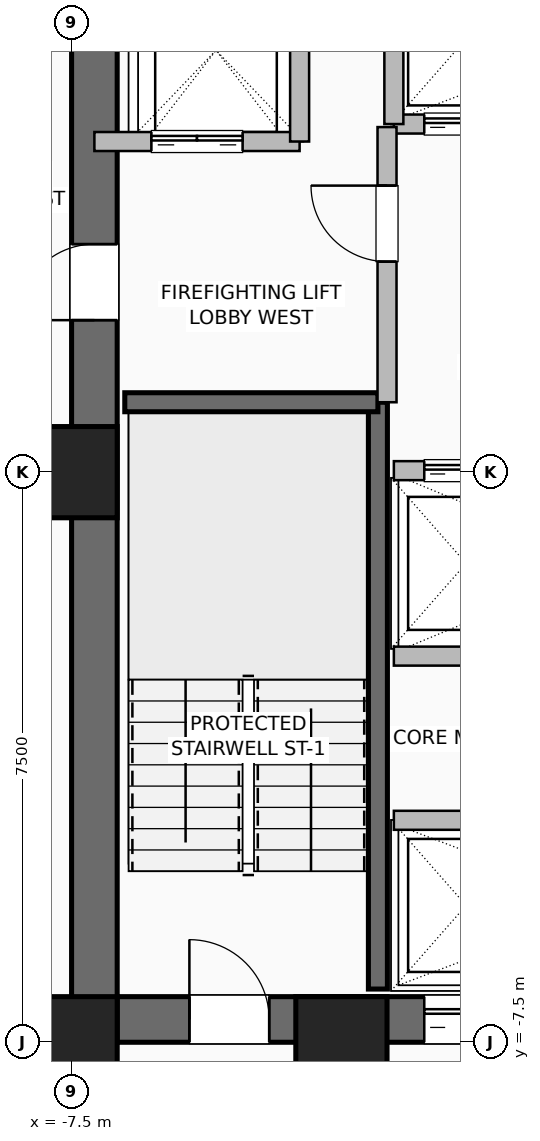
"""IFC4 building model, lengths in metres.
Left out: names, types, materials, properties, quantities, classifications, styles, units other than length and angle.
Written with IfcOpenShell. Run it as: python <this file> out.ifc"""

import sys

from ifc_helpers import new_model, si_unit, direction, frame, frame_2d, origin, origin_2d, place, context, subcontext, project, spatial, rectangle, hollow_rectangle, extrude, element, fill, save


model = new_model("IFC4")
c1 = context("Model", 3, precision=1e-05, world=origin(), true_north=direction((0.0, 1.0)))
c2 = subcontext(c1, "Body", "Model", "MODEL_VIEW")
j1 = project(units=[si_unit("LENGTHUNIT", "METRE"), si_unit("PLANEANGLEUNIT", "RADIAN")], contexts=[c1])
p1 = place(None, origin())
s1 = spatial("IfcSite", under=j1, at=p1, CompositionType="ELEMENT")
p2 = place(p1, origin())
s2 = spatial("IfcBuilding", under=s1, at=p2, CompositionType="ELEMENT")
p3 = place(p2, frame((0.0, 0.0, 51.5)))
s3 = spatial("IfcBuildingStorey", under=s2, at=p3, CompositionType="ELEMENT", Elevation=51.5)
for number, where, z_axis, x_axis in (
    (1, (-7.5, -7.5, 0.0), (0.0, 0.0, 1.0), (1.0, 0.0, 0.0)),
    (2, (-3.95, -7.5, 0.0), (0.0, 0.0, 1.0), (1.0, 0.0, 0.0)),
    (3, (-7.5, 0.0, 0.0), (0.0, 0.0, 1.0), (1.0, 0.0, 0.0)),
):
    element("IfcColumn", number, at=place(p3, frame(where, z_axis=z_axis, x_axis=x_axis)), inside=s3, PredefinedType="COLUMN", context=c2, shape_type="SweptSolid", body=[
        extrude(hollow_rectangle(XDim=1.2, YDim=1.2, WallThickness=0.055, at=origin_2d()), origin(), (0.0, 0.0, 1.0), 3.5),
    ])
p4 = place(p3, frame((-7.5, -7.2, 0.0), z_axis=(0.0, 0.0, 1.0), x_axis=(1.0, 0.0, 0.0)))
e4 = element("IfcWall", 4, at=p4, inside=s3, PredefinedType="SHEAR", context=c2, shape_type="SweptSolid", body=[
    extrude(rectangle(XDim=15.0, YDim=0.6, at=frame_2d((7.5, 0.0))), origin(), (0.0, 0.0, 1.0), 3.25),
])
p5 = place(p4, frame((1.55, 0.0, 0.0)))
e5 = element("IfcOpeningElement", 5, at=p5, cuts=e4, PredefinedType="OPENING", context=c2, shape_type="SweptSolid", body=[
    extrude(rectangle(XDim=1.05, YDim=2.08, at=frame_2d((0.525, 1.04))), frame((0.0, 0.31, 0.0), z_axis=(0.0, -1.0, 0.0), x_axis=(1.0, 0.0, 0.0)), (0.0, 0.0, 1.0), 0.62),
])
p6 = place(p4, frame((12.4, 0.0, 0.0)))
e6 = element("IfcOpeningElement", 6, at=p6, cuts=e4, PredefinedType="OPENING", context=c2, shape_type="SweptSolid", body=[
    extrude(rectangle(XDim=1.05, YDim=2.08, at=frame_2d((0.525, 1.04))), frame((0.0, 0.31, 0.0), z_axis=(0.0, -1.0, 0.0), x_axis=(1.0, 0.0, 0.0)), (0.0, 0.0, 1.0), 0.62),
])
p7 = place(p4, frame((4.64, 0.0, 0.0)))
e7 = element("IfcOpeningElement", 7, at=p7, cuts=e4, PredefinedType="OPENING", context=c2, shape_type="SweptSolid", body=[
    extrude(rectangle(XDim=1.1, YDim=2.2, at=frame_2d((0.55, 1.1))), frame((0.0, 0.31, 0.0), z_axis=(0.0, -1.0, 0.0), x_axis=(1.0, 0.0, 0.0)), (0.0, 0.0, 1.0), 0.62),
])
p8 = place(p4, frame((6.52, 0.0, 0.0)))
e8 = element("IfcOpeningElement", 8, at=p8, cuts=e4, PredefinedType="OPENING", context=c2, shape_type="SweptSolid", body=[
    extrude(rectangle(XDim=1.1, YDim=2.2, at=frame_2d((0.55, 1.1))), frame((0.0, 0.31, 0.0), z_axis=(0.0, -1.0, 0.0), x_axis=(1.0, 0.0, 0.0)), (0.0, 0.0, 1.0), 0.62),
])
p9 = place(p4, frame((8.4, 0.0, 0.0)))
e9 = element("IfcOpeningElement", 9, at=p9, cuts=e4, PredefinedType="OPENING", context=c2, shape_type="SweptSolid", body=[
    extrude(rectangle(XDim=1.1, YDim=2.2, at=frame_2d((0.55, 1.1))), frame((0.0, 0.31, 0.0), z_axis=(0.0, -1.0, 0.0), x_axis=(1.0, 0.0, 0.0)), (0.0, 0.0, 1.0), 0.62),
])
p10 = place(p3, frame((-7.2, -7.5, 0.0), z_axis=(0.0, 0.0, 1.0), x_axis=(0.0, 1.0, 0.0)))
e10 = element("IfcWall", 10, at=p10, inside=s3, PredefinedType="SHEAR", context=c2, shape_type="SweptSolid", body=[
    extrude(rectangle(XDim=15.0, YDim=0.6, at=frame_2d((7.5, 0.0))), origin(), (0.0, 0.0, 1.0), 3.25),
])
p11 = place(p10, frame((9.5, 0.0, 0.0)))
e11 = element("IfcOpeningElement", 11, at=p11, cuts=e10, PredefinedType="OPENING", context=c2, shape_type="SweptSolid", body=[
    extrude(rectangle(XDim=1.0, YDim=2.08, at=frame_2d((0.5, 1.04))), frame((0.0, 0.31, 0.0), z_axis=(0.0, -1.0, 0.0), x_axis=(1.0, 0.0, 0.0)), (0.0, 0.0, 1.0), 0.62),
])
p12 = place(p3, frame((-3.47, -6.8, 0.0), z_axis=(0.0, 0.0, 1.0), x_axis=(0.0, 1.0, 0.0)))
e12 = element("IfcWall", 12, at=p12, inside=s3, PredefinedType="SHEAR", context=c2, shape_type="SweptSolid", body=[
    extrude(rectangle(XDim=7.72, YDim=0.25, at=frame_2d((3.86, 0.0))), origin(), (0.0, 0.0, 1.0), 3.25),
])
p13 = place(p3, frame((-6.8, 0.92, 0.0), z_axis=(0.0, 0.0, 1.0), x_axis=(1.0, 0.0, 0.0)))
e13 = element("IfcWall", 13, at=p13, inside=s3, PredefinedType="SHEAR", context=c2, shape_type="SweptSolid", body=[
    extrude(rectangle(XDim=3.33, YDim=0.25, at=frame_2d((1.665, 0.0))), origin(), (0.0, 0.0, 1.0), 3.25),
])
p14 = place(p3, frame((-3.26, -4.58, 0.0), z_axis=(0.0, 0.0, 1.0), x_axis=(1.0, 0.0, 0.0)))
e14 = element("IfcWall", 14, at=p14, inside=s3, PredefinedType="SHEAR", context=c2, shape_type="SweptSolid", body=[
    extrude(rectangle(XDim=5.64, YDim=0.25, at=frame_2d((2.82, 0.0))), origin(), (0.0, 0.0, 1.0), 3.25),
])
p15 = place(p3, frame((-3.26, 0.02, 0.0), z_axis=(0.0, 0.0, 1.0), x_axis=(1.0, 0.0, 0.0)))
e15 = element("IfcWall", 15, at=p15, inside=s3, PredefinedType="SHEAR", context=c2, shape_type="SweptSolid", body=[
    extrude(rectangle(XDim=5.64, YDim=0.25, at=frame_2d((2.82, 0.0))), origin(), (0.0, 0.0, 1.0), 3.25),
])
p16 = place(p15, frame((0.4, 0.0, 0.0)))
e16 = element("IfcOpeningElement", 16, at=p16, cuts=e15, PredefinedType="OPENING", context=c2, shape_type="SweptSolid", body=[
    extrude(rectangle(XDim=1.1, YDim=2.2, at=frame_2d((0.55, 1.1))), frame((0.0, 0.135, 0.0), z_axis=(0.0, -1.0, 0.0), x_axis=(1.0, 0.0, 0.0)), (0.0, 0.0, 1.0), 0.27),
])
p17 = place(p15, frame((2.28, 0.0, 0.0)))
e17 = element("IfcOpeningElement", 17, at=p17, cuts=e15, PredefinedType="OPENING", context=c2, shape_type="SweptSolid", body=[
    extrude(rectangle(XDim=1.1, YDim=2.2, at=frame_2d((0.55, 1.1))), frame((0.0, 0.135, 0.0), z_axis=(0.0, -1.0, 0.0), x_axis=(1.0, 0.0, 0.0)), (0.0, 0.0, 1.0), 0.27),
])
p18 = place(p15, frame((4.16, 0.0, 0.0)))
e18 = element("IfcOpeningElement", 18, at=p18, cuts=e15, PredefinedType="OPENING", context=c2, shape_type="SweptSolid", body=[
    extrude(rectangle(XDim=1.1, YDim=2.2, at=frame_2d((0.55, 1.1))), frame((0.0, 0.135, 0.0), z_axis=(0.0, -1.0, 0.0), x_axis=(1.0, 0.0, 0.0)), (0.0, 0.0, 1.0), 0.27),
])
p19 = place(p3, frame((-3.26, -2.42, 0.0), z_axis=(0.0, 0.0, 1.0), x_axis=(1.0, 0.0, 0.0)))
e19 = element("IfcWall", 19, at=p19, inside=s3, PredefinedType="SHEAR", context=c2, shape_type="SweptSolid", body=[
    extrude(rectangle(XDim=5.64, YDim=0.25, at=frame_2d((2.82, 0.0))), origin(), (0.0, 0.0, 1.0), 3.25),
])
p20 = place(p3, frame((-3.26, 4.58, 0.0), z_axis=(0.0, 0.0, 1.0), x_axis=(1.0, 0.0, 0.0)))
e20 = element("IfcWall", 20, at=p20, inside=s3, PredefinedType="SHEAR", context=c2, shape_type="SweptSolid", body=[
    extrude(rectangle(XDim=5.64, YDim=0.25, at=frame_2d((2.82, 0.0))), origin(), (0.0, 0.0, 1.0), 3.25),
])
p21 = place(p20, frame((0.4, 0.0, 0.0)))
e21 = element("IfcOpeningElement", 21, at=p21, cuts=e20, PredefinedType="OPENING", context=c2, shape_type="SweptSolid", body=[
    extrude(rectangle(XDim=1.1, YDim=2.2, at=frame_2d((0.55, 1.1))), frame((0.0, 0.135, 0.0), z_axis=(0.0, -1.0, 0.0), x_axis=(1.0, 0.0, 0.0)), (0.0, 0.0, 1.0), 0.27),
])
p22 = place(p20, frame((2.28, 0.0, 0.0)))
e22 = element("IfcOpeningElement", 22, at=p22, cuts=e20, PredefinedType="OPENING", context=c2, shape_type="SweptSolid", body=[
    extrude(rectangle(XDim=1.1, YDim=2.2, at=frame_2d((0.55, 1.1))), frame((0.0, 0.135, 0.0), z_axis=(0.0, -1.0, 0.0), x_axis=(1.0, 0.0, 0.0)), (0.0, 0.0, 1.0), 0.27),
])
p23 = place(p20, frame((4.16, 0.0, 0.0)))
e23 = element("IfcOpeningElement", 23, at=p23, cuts=e20, PredefinedType="OPENING", context=c2, shape_type="SweptSolid", body=[
    extrude(rectangle(XDim=1.1, YDim=2.2, at=frame_2d((0.55, 1.1))), frame((0.0, 0.135, 0.0), z_axis=(0.0, -1.0, 0.0), x_axis=(1.0, 0.0, 0.0)), (0.0, 0.0, 1.0), 0.27),
])
p24 = place(p3, frame((-3.26, 4.58, 0.0), z_axis=(0.0, 0.0, 1.0), x_axis=(0.0, 1.0, 0.0)))
e24 = element("IfcWall", 24, at=p24, inside=s3, PredefinedType="SHEAR", context=c2, shape_type="SweptSolid", body=[
    extrude(rectangle(XDim=2.22, YDim=0.25, at=frame_2d((1.11, 0.0))), origin(), (0.0, 0.0, 1.0), 3.25),
])
p25 = place(p3, frame((-7.2, 4.35, 0.0), z_axis=(0.0, 0.0, 1.0), x_axis=(1.0, 0.0, 0.0)))
e25 = element("IfcWall", 25, at=p25, inside=s3, PredefinedType="SHEAR", context=c2, shape_type="SweptSolid", body=[
    extrude(rectangle(XDim=2.7, YDim=0.25, at=frame_2d((1.35, 0.0))), origin(), (0.0, 0.0, 1.0), 3.25),
])
p26 = place(p25, frame((0.75, 0.0, 0.0)))
e26 = element("IfcOpeningElement", 26, at=p26, cuts=e25, PredefinedType="OPENING", context=c2, shape_type="SweptSolid", body=[
    extrude(rectangle(XDim=1.2, YDim=2.2, at=frame_2d((0.6, 1.1))), frame((0.0, 0.135, 0.0), z_axis=(0.0, -1.0, 0.0), x_axis=(1.0, 0.0, 0.0)), (0.0, 0.0, 1.0), 0.27),
])
p27 = place(p3, frame((-4.5, 4.35, 0.0), z_axis=(0.0, 0.0, 1.0), x_axis=(0.0, 1.0, 0.0)))
e27 = element("IfcWall", 27, at=p27, inside=s3, PredefinedType="SHEAR", context=c2, shape_type="SweptSolid", body=[
    extrude(rectangle(XDim=2.85, YDim=0.25, at=frame_2d((1.425, 0.0))), origin(), (0.0, 0.0, 1.0), 3.25),
])
p28 = place(p3, frame((-3.35, 0.92, 0.0), z_axis=(0.0, 0.0, 1.0), x_axis=(0.0, 1.0, 0.0)))
e28 = element("IfcWall", 28, at=p28, inside=s3, PredefinedType="SHEAR", context=c2, shape_type="SweptSolid", body=[
    extrude(rectangle(XDim=3.62, YDim=0.25, at=frame_2d((1.81, 0.0))), origin(), (0.0, 0.0, 1.0), 3.25),
])
p29 = place(p28, frame((1.85, 0.0, 0.0)))
e29 = element("IfcOpeningElement", 29, at=p29, cuts=e28, PredefinedType="OPENING", context=c2, shape_type="SweptSolid", body=[
    extrude(rectangle(XDim=1.0, YDim=2.08, at=frame_2d((0.5, 1.04))), frame((0.0, 0.135, 0.0), z_axis=(0.0, -1.0, 0.0), x_axis=(1.0, 0.0, 0.0)), (0.0, 0.0, 1.0), 0.27),
])
p30 = place(p5, origin())
e30 = element("IfcDoor", 30, at=p30, inside=s3, OperationType="SINGLE_SWING_LEFT", PredefinedType="DOOR", context=c2, shape_type="SweptSolid", body=[
    extrude(rectangle(XDim=1.05, YDim=2.08, at=frame_2d((0.525, 1.04))), frame((0.0, 0.025, 0.0), z_axis=(0.0, -1.0, 0.0), x_axis=(1.0, 0.0, 0.0)), (0.0, 0.0, 1.0), 0.05),
])
fill(e5, e30)
p31 = place(p11, origin())
e31 = element("IfcDoor", 31, at=p31, inside=s3, OperationType="SINGLE_SWING_LEFT", PredefinedType="DOOR", context=c2, shape_type="SweptSolid", body=[
    extrude(rectangle(XDim=1.0, YDim=2.08, at=frame_2d((0.5, 1.04))), frame((0.0, 0.025, 0.0), z_axis=(0.0, -1.0, 0.0), x_axis=(1.0, 0.0, 0.0)), (0.0, 0.0, 1.0), 0.05),
])
fill(e11, e31)
p32 = place(p7, origin())
e32 = element("IfcDoor", 32, at=p32, inside=s3, OperationType="DOUBLE_DOOR_SLIDING", PredefinedType="DOOR", context=c2, shape_type="SweptSolid", body=[
    extrude(rectangle(XDim=1.1, YDim=2.2, at=frame_2d((0.55, 1.1))), frame((0.0, 0.025, 0.0), z_axis=(0.0, -1.0, 0.0), x_axis=(1.0, 0.0, 0.0)), (0.0, 0.0, 1.0), 0.05),
])
fill(e7, e32)
p33 = place(p16, origin())
e33 = element("IfcDoor", 33, at=p33, inside=s3, OperationType="DOUBLE_DOOR_SLIDING", PredefinedType="DOOR", context=c2, shape_type="SweptSolid", body=[
    extrude(rectangle(XDim=1.1, YDim=2.2, at=frame_2d((0.55, 1.1))), frame((0.0, 0.025, 0.0), z_axis=(0.0, -1.0, 0.0), x_axis=(1.0, 0.0, 0.0)), (0.0, 0.0, 1.0), 0.05),
])
fill(e16, e33)
p34 = place(p21, origin())
e34 = element("IfcDoor", 34, at=p34, inside=s3, OperationType="DOUBLE_DOOR_SLIDING", PredefinedType="DOOR", context=c2, shape_type="SweptSolid", body=[
    extrude(rectangle(XDim=1.1, YDim=2.2, at=frame_2d((0.55, 1.1))), frame((0.0, 0.025, 0.0), z_axis=(0.0, -1.0, 0.0), x_axis=(1.0, 0.0, 0.0)), (0.0, 0.0, 1.0), 0.05),
])
fill(e21, e34)
p35 = place(p26, origin())
e35 = element("IfcDoor", 35, at=p35, inside=s3, OperationType="DOUBLE_DOOR_SLIDING", PredefinedType="DOOR", context=c2, shape_type="SweptSolid", body=[
    extrude(rectangle(XDim=1.2, YDim=2.2, at=frame_2d((0.6, 1.1))), frame((0.0, 0.025, 0.0), z_axis=(0.0, -1.0, 0.0), x_axis=(1.0, 0.0, 0.0)), (0.0, 0.0, 1.0), 0.05),
])
fill(e26, e35)
p36 = place(p29, origin())
e36 = element("IfcDoor", 36, at=p36, inside=s3, OperationType="SINGLE_SWING_RIGHT", PredefinedType="DOOR", context=c2, shape_type="SweptSolid", body=[
    extrude(rectangle(XDim=1.0, YDim=2.08, at=frame_2d((0.5, 1.04))), frame((0.0, 0.025, 0.0), z_axis=(0.0, -1.0, 0.0), x_axis=(1.0, 0.0, 0.0)), (0.0, 0.0, 1.0), 0.05),
])
fill(e29, e36)
save(model, sys.argv[1])
